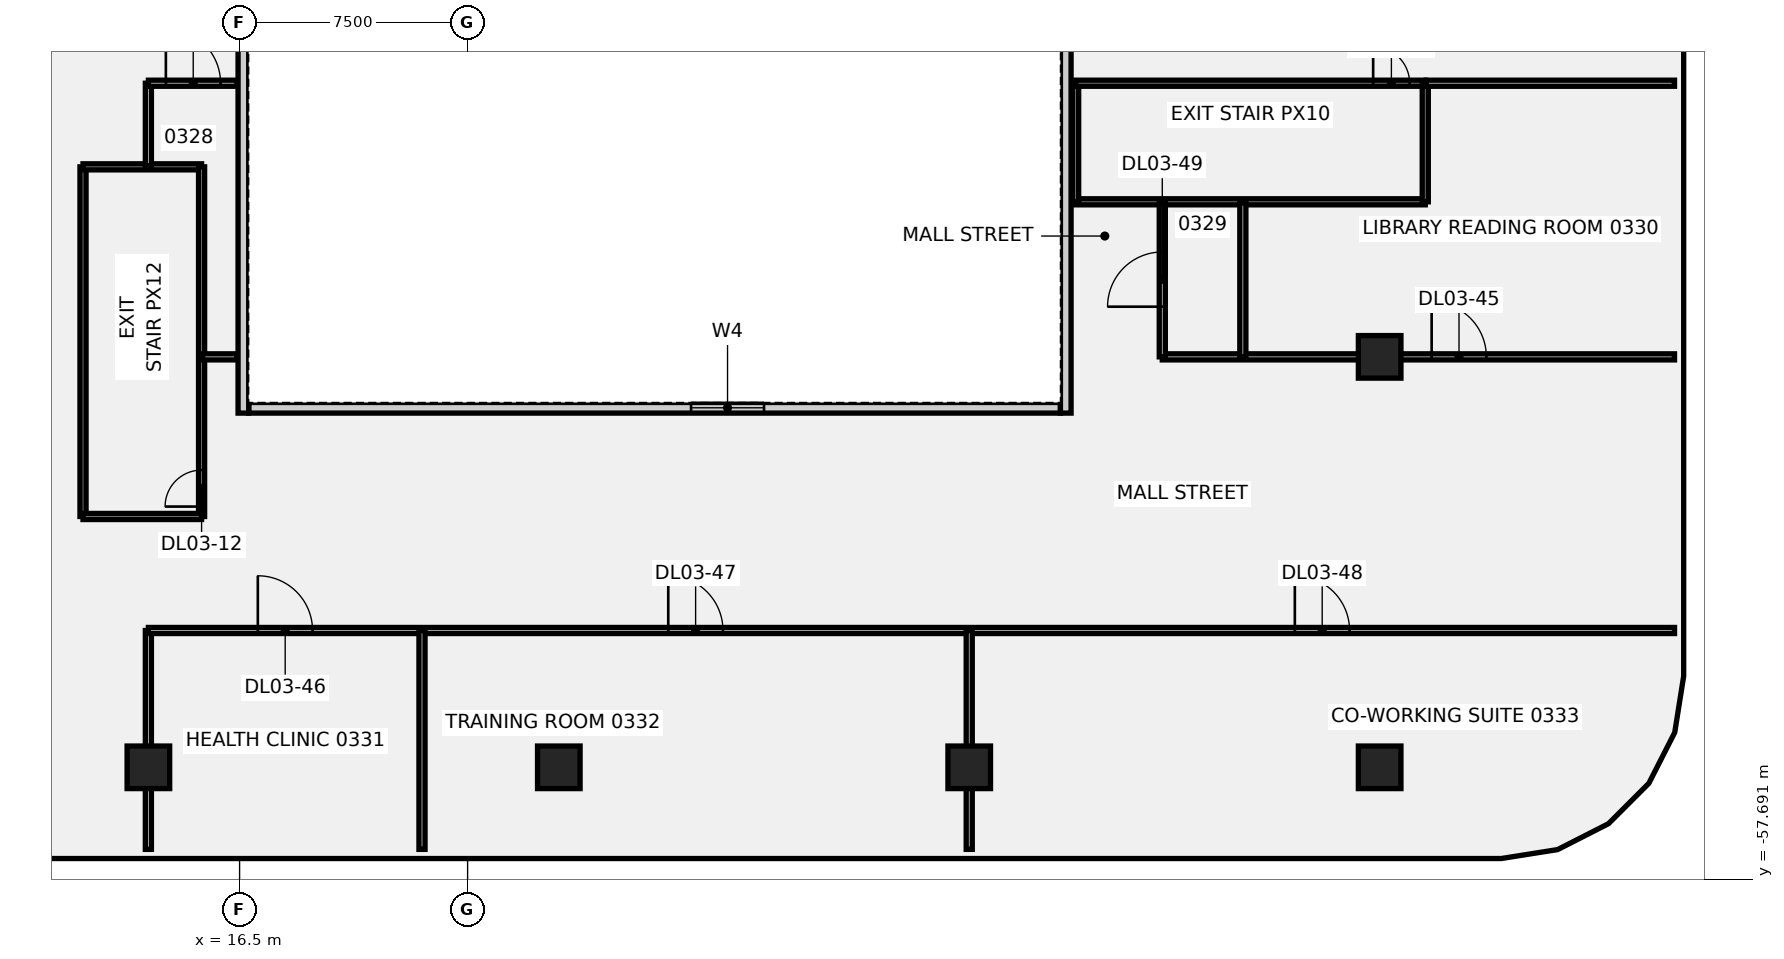
"""IFC4 building model, lengths in metres.
Left out: names, types, materials, properties, quantities, classifications, styles, units other than length and angle.
Written with IfcOpenShell. Run it as: python <this file> out.ifc"""

import sys

from ifc_helpers import new_model, si_unit, direction, frame, frame_2d, origin, origin_2d, place, context, subcontext, project, spatial, rectangle, extrude, element, fill, save


model = new_model("IFC4")
c1 = context("Model", 3, precision=1e-05, world=origin(), true_north=direction((0.0, 1.0)))
c2 = subcontext(c1, "Body", "Model", "MODEL_VIEW")
j1 = project(units=[si_unit("LENGTHUNIT", "METRE"), si_unit("PLANEANGLEUNIT", "RADIAN")], contexts=[c1])
p1 = place(None, origin())
s1 = spatial("IfcSite", under=j1, at=p1, CompositionType="ELEMENT")
p2 = place(p1, origin())
s2 = spatial("IfcBuilding", under=s1, at=p2, CompositionType="ELEMENT")
p3 = place(p2, frame((0.0, 0.0, 20.0)))
s3 = spatial("IfcBuildingStorey", under=s2, at=p3, CompositionType="ELEMENT", Elevation=20.0)
for number, where, z_axis, x_axis in (
    (1, (13.5, -54.0, -0.5), (0.0, 0.0, 1.0), (1.0, 0.0, 0.0)),
    (2, (27.0, -54.0, -0.5), (0.0, 0.0, 1.0), (1.0, 0.0, 0.0)),
    (3, (40.5, -54.0, -0.5), (0.0, 0.0, 1.0), (1.0, 0.0, 0.0)),
    (4, (54.0, -54.0, -0.5), (0.0, 0.0, 1.0), (1.0, 0.0, 0.0)),
    (5, (54.0, -40.5, -0.5), (0.0, 0.0, 1.0), (1.0, 0.0, 0.0)),
):
    element("IfcColumn", number, at=place(p3, frame(where, z_axis=z_axis, x_axis=x_axis)), inside=s3, PredefinedType="COLUMN", context=c2, shape_type="SweptSolid", body=[
        extrude(rectangle(XDim=1.4, YDim=1.4, at=origin_2d()), origin(), (0.0, 0.0, 1.0), 5.05),
    ])
p4 = place(p3, frame((11.35, -45.75, 0.0), z_axis=(0.0, 0.0, 1.0), x_axis=(0.0, 1.0, 0.0)))
e6 = element("IfcWall", 6, at=p4, inside=s3, PredefinedType="PARTITIONING", context=c2, shape_type="SweptSolid", body=[
    extrude(rectangle(XDim=11.5, YDim=0.2, at=frame_2d((5.75, 0.0))), origin(), (0.0, 0.0, 1.0), 4.55),
])
p5 = place(p3, frame((11.35, -34.25, 0.0), z_axis=(0.0, 0.0, 1.0), x_axis=(1.0, 0.0, 0.0)))
e7 = element("IfcWall", 7, at=p5, inside=s3, PredefinedType="PARTITIONING", context=c2, shape_type="SweptSolid", body=[
    extrude(rectangle(XDim=3.9, YDim=0.2, at=frame_2d((1.95, 0.0))), origin(), (0.0, 0.0, 1.0), 4.55),
])
p6 = place(p3, frame((15.25, -45.75, 0.0), z_axis=(0.0, 0.0, 1.0), x_axis=(0.0, 1.0, 0.0)))
e8 = element("IfcWall", 8, at=p6, inside=s3, PredefinedType="PARTITIONING", context=c2, shape_type="SweptSolid", body=[
    extrude(rectangle(XDim=11.5, YDim=0.2, at=frame_2d((5.75, 0.0))), origin(), (0.0, 0.0, 1.0), 4.55),
])
p7 = place(p6, frame((0.326, 0.0, 0.0)))
e9 = element("IfcOpeningElement", 9, at=p7, cuts=e8, PredefinedType="OPENING", context=c2, shape_type="SweptSolid", body=[
    extrude(rectangle(XDim=1.2, YDim=2.1, at=frame_2d((0.6, 1.05))), frame((0.0, 0.11, 0.0), z_axis=(0.0, -1.0, 0.0), x_axis=(1.0, 0.0, 0.0)), (0.0, 0.0, 1.0), 0.22),
])
p8 = place(p3, frame((11.35, -45.75, 0.0), z_axis=(0.0, 0.0, 1.0), x_axis=(1.0, 0.0, 0.0)))
e10 = element("IfcWall", 10, at=p8, inside=s3, PredefinedType="PARTITIONING", context=c2, shape_type="SweptSolid", body=[
    extrude(rectangle(XDim=3.9, YDim=0.2, at=frame_2d((1.95, 0.0))), origin(), (0.0, 0.0, 1.0), 4.55),
])
p9 = place(p3, frame((44.0, -35.4, 0.0), z_axis=(0.0, 0.0, 1.0), x_axis=(1.0, 0.0, 0.0)))
e11 = element("IfcWall", 11, at=p9, inside=s3, PredefinedType="PARTITIONING", context=c2, shape_type="SweptSolid", body=[
    extrude(rectangle(XDim=11.5, YDim=0.2, at=frame_2d((5.75, 0.0))), origin(), (0.0, 0.0, 1.0), 4.55),
])
p10 = place(p3, frame((44.0, -35.4, 0.0), z_axis=(0.0, 0.0, 1.0), x_axis=(0.0, 1.0, 0.0)))
e12 = element("IfcWall", 12, at=p10, inside=s3, PredefinedType="PARTITIONING", context=c2, shape_type="SweptSolid", body=[
    extrude(rectangle(XDim=3.9, YDim=0.2, at=frame_2d((1.95, 0.0))), origin(), (0.0, 0.0, 1.0), 4.55),
])
p11 = place(p3, frame((44.0, -31.5, 0.0), z_axis=(0.0, 0.0, 1.0), x_axis=(1.0, 0.0, 0.0)))
e13 = element("IfcWall", 13, at=p11, inside=s3, PredefinedType="PARTITIONING", context=c2, shape_type="SweptSolid", body=[
    extrude(rectangle(XDim=11.5, YDim=0.2, at=frame_2d((5.75, 0.0))), origin(), (0.0, 0.0, 1.0), 4.55),
])
p12 = place(p11, frame((9.786, 0.0, 0.0)))
e14 = element("IfcOpeningElement", 14, at=p12, cuts=e13, PredefinedType="OPENING", context=c2, shape_type="SweptSolid", body=[
    extrude(rectangle(XDim=1.2, YDim=2.1, at=frame_2d((0.6, 1.05))), frame((0.0, 0.11, 0.0), z_axis=(0.0, -1.0, 0.0), x_axis=(1.0, 0.0, 0.0)), (0.0, 0.0, 1.0), 0.22),
])
p13 = place(p3, frame((55.5, -35.4, 0.0), z_axis=(0.0, 0.0, 1.0), x_axis=(0.0, 1.0, 0.0)))
e15 = element("IfcWall", 15, at=p13, inside=s3, PredefinedType="PARTITIONING", context=c2, shape_type="SweptSolid", body=[
    extrude(rectangle(XDim=3.9, YDim=0.2, at=frame_2d((1.95, 0.0))), origin(), (0.0, 0.0, 1.0), 4.55),
])
p14 = place(p3, frame((13.5, -56.699, 0.0), z_axis=(0.0, 0.0, 1.0), x_axis=(0.0, 1.0, 0.0)))
e16 = element("IfcWall", 16, at=p14, inside=s3, PredefinedType="PARTITIONING", context=c2, shape_type="SweptSolid", body=[
    extrude(rectangle(XDim=7.199, YDim=0.2, at=frame_2d((3.6, 0.0))), origin(), (0.0, 0.0, 1.0), 4.55),
])
p15 = place(p3, frame((13.5, -49.5, 0.0), z_axis=(0.0, 0.0, 1.0), x_axis=(1.0, 0.0, 0.0)))
e17 = element("IfcWall", 17, at=p15, inside=s3, PredefinedType="PARTITIONING", context=c2, shape_type="SweptSolid", body=[
    extrude(rectangle(XDim=50.199, YDim=0.2, at=frame_2d((25.1, 0.0))), origin(), (0.0, 0.0, 1.0), 4.55),
])
p16 = place(p15, frame((3.6, 0.0, 0.0)))
e18 = element("IfcOpeningElement", 18, at=p16, cuts=e17, PredefinedType="OPENING", context=c2, shape_type="SweptSolid", body=[
    extrude(rectangle(XDim=1.8, YDim=2.1, at=frame_2d((0.9, 1.05))), frame((0.0, 0.11, 0.0), z_axis=(0.0, -1.0, 0.0), x_axis=(1.0, 0.0, 0.0)), (0.0, 0.0, 1.0), 0.22),
])
p17 = place(p15, frame((17.1, 0.0, 0.0)))
e19 = element("IfcOpeningElement", 19, at=p17, cuts=e17, PredefinedType="OPENING", context=c2, shape_type="SweptSolid", body=[
    extrude(rectangle(XDim=1.8, YDim=2.1, at=frame_2d((0.9, 1.05))), frame((0.0, 0.11, 0.0), z_axis=(0.0, -1.0, 0.0), x_axis=(1.0, 0.0, 0.0)), (0.0, 0.0, 1.0), 0.22),
])
p18 = place(p15, frame((37.71, 0.0, 0.0)))
e20 = element("IfcOpeningElement", 20, at=p18, cuts=e17, PredefinedType="OPENING", context=c2, shape_type="SweptSolid", body=[
    extrude(rectangle(XDim=1.8, YDim=2.1, at=frame_2d((0.9, 1.05))), frame((0.0, 0.11, 0.0), z_axis=(0.0, -1.0, 0.0), x_axis=(1.0, 0.0, 0.0)), (0.0, 0.0, 1.0), 0.22),
])
p19 = place(p3, frame((13.5, -34.22, 0.0), z_axis=(0.0, 0.0, 1.0), x_axis=(0.0, 1.0, 0.0)))
e21 = element("IfcWall", 21, at=p19, inside=s3, PredefinedType="PARTITIONING", context=c2, shape_type="SweptSolid", body=[
    extrude(rectangle(XDim=2.72, YDim=0.2, at=frame_2d((1.36, 0.0))), origin(), (0.0, 0.0, 1.0), 4.55),
])
p20 = place(p3, frame((13.5, -31.5, 0.0), z_axis=(0.0, 0.0, 1.0), x_axis=(1.0, 0.0, 0.0)))
e22 = element("IfcWall", 22, at=p20, inside=s3, PredefinedType="PARTITIONING", context=c2, shape_type="SweptSolid", body=[
    extrude(rectangle(XDim=2.92, YDim=0.2, at=frame_2d((1.46, 0.0))), origin(), (0.0, 0.0, 1.0), 4.55),
])
p21 = place(p20, frame((0.575, 0.0, 0.0)))
e23 = element("IfcOpeningElement", 23, at=p21, cuts=e22, PredefinedType="OPENING", context=c2, shape_type="SweptSolid", body=[
    extrude(rectangle(XDim=1.8, YDim=2.1, at=frame_2d((0.9, 1.05))), frame((0.0, 0.11, 0.0), z_axis=(0.0, -1.0, 0.0), x_axis=(1.0, 0.0, 0.0)), (0.0, 0.0, 1.0), 0.22),
])
p22 = place(p3, frame((15.28, -40.5, 0.0), z_axis=(0.0, 0.0, 1.0), x_axis=(1.0, 0.0, 0.0)))
e24 = element("IfcWall", 24, at=p22, inside=s3, PredefinedType="PARTITIONING", context=c2, shape_type="SweptSolid", body=[
    extrude(rectangle(XDim=1.14, YDim=0.2, at=frame_2d((0.57, 0.0))), origin(), (0.0, 0.0, 1.0), 4.55),
])
for number, where, z_axis, x_axis in (
    (25, (22.5, -56.699, 0.0), (0.0, 0.0, 1.0), (0.0, 1.0, 0.0)),
    (26, (40.5, -56.699, 0.0), (0.0, 0.0, 1.0), (0.0, 1.0, 0.0)),
):
    element("IfcWall", number, at=place(p3, frame(where, z_axis=z_axis, x_axis=x_axis)), inside=s3, PredefinedType="PARTITIONING", context=c2, shape_type="SweptSolid", body=[
        extrude(rectangle(XDim=7.199, YDim=0.2, at=frame_2d((3.6, 0.0))), origin(), (0.0, 0.0, 1.0), 4.55),
    ])
p23 = place(p3, frame((46.85, -40.5, 0.0), z_axis=(0.0, 0.0, 1.0), x_axis=(1.0, 0.0, 0.0)))
e27 = element("IfcWall", 27, at=p23, inside=s3, PredefinedType="PARTITIONING", context=c2, shape_type="SweptSolid", body=[
    extrude(rectangle(XDim=16.849, YDim=0.2, at=frame_2d((8.424, 0.0))), origin(), (0.0, 0.0, 1.0), 4.55),
])
p24 = place(p23, frame((8.86, 0.0, 0.0)))
e28 = element("IfcOpeningElement", 28, at=p24, cuts=e27, PredefinedType="OPENING", context=c2, shape_type="SweptSolid", body=[
    extrude(rectangle(XDim=1.8, YDim=2.1, at=frame_2d((0.9, 1.05))), frame((0.0, 0.11, 0.0), z_axis=(0.0, -1.0, 0.0), x_axis=(1.0, 0.0, 0.0)), (0.0, 0.0, 1.0), 0.22),
])
p25 = place(p3, frame((46.85, -40.5, 0.0), z_axis=(0.0, 0.0, 1.0), x_axis=(0.0, 1.0, 0.0)))
e29 = element("IfcWall", 29, at=p25, inside=s3, PredefinedType="PARTITIONING", context=c2, shape_type="SweptSolid", body=[
    extrude(rectangle(XDim=5.07, YDim=0.2, at=frame_2d((2.535, 0.0))), origin(), (0.0, 0.0, 1.0), 4.55),
])
p26 = place(p25, frame((1.65, 0.0, 0.0)))
e30 = element("IfcOpeningElement", 30, at=p26, cuts=e29, PredefinedType="OPENING", context=c2, shape_type="SweptSolid", body=[
    extrude(rectangle(XDim=1.8, YDim=2.1, at=frame_2d((0.9, 1.05))), frame((0.0, 0.11, 0.0), z_axis=(0.0, -1.0, 0.0), x_axis=(1.0, 0.0, 0.0)), (0.0, 0.0, 1.0), 0.22),
])
p27 = place(p3, frame((49.5, -40.5, 0.0), z_axis=(0.0, 0.0, 1.0), x_axis=(0.0, 1.0, 0.0)))
e31 = element("IfcWall", 31, at=p27, inside=s3, PredefinedType="PARTITIONING", context=c2, shape_type="SweptSolid", body=[
    extrude(rectangle(XDim=5.07, YDim=0.2, at=frame_2d((2.535, 0.0))), origin(), (0.0, 0.0, 1.0), 4.55),
])
p28 = place(p3, frame((55.53, -31.5, 0.0), z_axis=(0.0, 0.0, 1.0), x_axis=(1.0, 0.0, 0.0)))
e32 = element("IfcWall", 32, at=p28, inside=s3, PredefinedType="PARTITIONING", context=c2, shape_type="SweptSolid", body=[
    extrude(rectangle(XDim=8.169, YDim=0.2, at=frame_2d((4.084, 0.0))), origin(), (0.0, 0.0, 1.0), 4.55),
])
p29 = place(p3, frame((16.8, -42.175, 0.0), z_axis=(0.0, 0.0, 1.0), x_axis=(1.0, 0.0, 0.0)))
e33 = element("IfcWall", 33, at=p29, inside=s3, PredefinedType="SOLIDWALL", context=c2, shape_type="SweptSolid", body=[
    extrude(rectangle(XDim=26.7, YDim=0.35, at=frame_2d((13.35, 0.0))), origin(), (0.0, 0.0, 1.0), 4.55),
])
p30 = place(p29, frame((14.55, 0.0, 1.0)))
e34 = element("IfcOpeningElement", 34, at=p30, cuts=e33, PredefinedType="OPENING", context=c2, shape_type="SweptSolid", body=[
    extrude(rectangle(XDim=2.4, YDim=1.8, at=frame_2d((1.2, 0.9))), frame((0.0, 0.185, 0.0), z_axis=(0.0, -1.0, 0.0), x_axis=(1.0, 0.0, 0.0)), (0.0, 0.0, 1.0), 0.37),
])
p31 = place(p3, frame((16.625, -42.35, 0.0), z_axis=(0.0, 0.0, 1.0), x_axis=(0.0, 1.0, 0.0)))
e35 = element("IfcWall", 35, at=p31, inside=s3, PredefinedType="SOLIDWALL", context=c2, shape_type="SweptSolid", body=[
    extrude(rectangle(XDim=18.7, YDim=0.35, at=frame_2d((9.35, 0.0))), origin(), (0.0, 0.0, 1.0), 4.55),
])
p32 = place(p31, frame((14.9, 0.0, 1.0)))
e36 = element("IfcOpeningElement", 36, at=p32, cuts=e35, PredefinedType="OPENING", context=c2, shape_type="SweptSolid", body=[
    extrude(rectangle(XDim=2.4, YDim=1.8, at=frame_2d((1.2, 0.9))), frame((0.0, 0.185, 0.0), z_axis=(0.0, -1.0, 0.0), x_axis=(1.0, 0.0, 0.0)), (0.0, 0.0, 1.0), 0.37),
])
p33 = place(p3, frame((43.675, -42.35, 0.0), z_axis=(0.0, 0.0, 1.0), x_axis=(0.0, 1.0, 0.0)))
e37 = element("IfcWall", 37, at=p33, inside=s3, PredefinedType="SOLIDWALL", context=c2, shape_type="SweptSolid", body=[
    extrude(rectangle(XDim=18.7, YDim=0.35, at=frame_2d((9.35, 0.0))), origin(), (0.0, 0.0, 1.0), 4.55),
])
p34 = place(p33, frame((14.9, 0.0, 1.0)))
e38 = element("IfcOpeningElement", 38, at=p34, cuts=e37, PredefinedType="OPENING", context=c2, shape_type="SweptSolid", body=[
    extrude(rectangle(XDim=2.4, YDim=1.8, at=frame_2d((1.2, 0.9))), frame((0.0, 0.185, 0.0), z_axis=(0.0, -1.0, 0.0), x_axis=(1.0, 0.0, 0.0)), (0.0, 0.0, 1.0), 0.37),
])
p35 = place(p12, origin())
e39 = element("IfcDoor", 39, at=p35, inside=s3, OperationType="SINGLE_SWING_RIGHT", PredefinedType="DOOR", context=c2, shape_type="SweptSolid", body=[
    extrude(rectangle(XDim=1.2, YDim=2.1, at=frame_2d((0.6, 1.05))), frame((0.0, 0.025, 0.0), z_axis=(0.0, -1.0, 0.0), x_axis=(1.0, 0.0, 0.0)), (0.0, 0.0, 1.0), 0.05),
])
fill(e14, e39)
p36 = place(p7, origin())
e40 = element("IfcDoor", 40, at=p36, inside=s3, OperationType="SINGLE_SWING_RIGHT", PredefinedType="DOOR", context=c2, shape_type="SweptSolid", body=[
    extrude(rectangle(XDim=1.2, YDim=2.1, at=frame_2d((0.6, 1.05))), frame((0.0, 0.025, 0.0), z_axis=(0.0, -1.0, 0.0), x_axis=(1.0, 0.0, 0.0)), (0.0, 0.0, 1.0), 0.05),
])
fill(e9, e40)
p37 = place(p21, origin())
e41 = element("IfcDoor", 41, at=p37, inside=s3, OperationType="SINGLE_SWING_RIGHT", PredefinedType="DOOR", context=c2, shape_type="SweptSolid", body=[
    extrude(rectangle(XDim=1.8, YDim=2.1, at=frame_2d((0.9, 1.05))), frame((0.0, 0.025, 0.0), z_axis=(0.0, -1.0, 0.0), x_axis=(1.0, 0.0, 0.0)), (0.0, 0.0, 1.0), 0.05),
])
fill(e23, e41)
p38 = place(p24, origin())
e42 = element("IfcDoor", 42, at=p38, inside=s3, OperationType="SINGLE_SWING_LEFT", PredefinedType="DOOR", context=c2, shape_type="SweptSolid", body=[
    extrude(rectangle(XDim=1.8, YDim=2.1, at=frame_2d((0.9, 1.05))), frame((0.0, 0.025, 0.0), z_axis=(0.0, -1.0, 0.0), x_axis=(1.0, 0.0, 0.0)), (0.0, 0.0, 1.0), 0.05),
])
fill(e28, e42)
p39 = place(p16, origin())
e43 = element("IfcDoor", 43, at=p39, inside=s3, OperationType="SINGLE_SWING_RIGHT", PredefinedType="DOOR", context=c2, shape_type="SweptSolid", body=[
    extrude(rectangle(XDim=1.8, YDim=2.1, at=frame_2d((0.9, 1.05))), frame((0.0, 0.025, 0.0), z_axis=(0.0, -1.0, 0.0), x_axis=(1.0, 0.0, 0.0)), (0.0, 0.0, 1.0), 0.05),
])
fill(e18, e43)
p40 = place(p17, origin())
e44 = element("IfcDoor", 44, at=p40, inside=s3, OperationType="SINGLE_SWING_LEFT", PredefinedType="DOOR", context=c2, shape_type="SweptSolid", body=[
    extrude(rectangle(XDim=1.8, YDim=2.1, at=frame_2d((0.9, 1.05))), frame((0.0, 0.025, 0.0), z_axis=(0.0, -1.0, 0.0), x_axis=(1.0, 0.0, 0.0)), (0.0, 0.0, 1.0), 0.05),
])
fill(e19, e44)
p41 = place(p18, origin())
e45 = element("IfcDoor", 45, at=p41, inside=s3, OperationType="SINGLE_SWING_RIGHT", PredefinedType="DOOR", context=c2, shape_type="SweptSolid", body=[
    extrude(rectangle(XDim=1.8, YDim=2.1, at=frame_2d((0.9, 1.05))), frame((0.0, 0.025, 0.0), z_axis=(0.0, -1.0, 0.0), x_axis=(1.0, 0.0, 0.0)), (0.0, 0.0, 1.0), 0.05),
])
fill(e20, e45)
p42 = place(p26, origin())
e46 = element("IfcDoor", 46, at=p42, inside=s3, OperationType="SINGLE_SWING_LEFT", PredefinedType="DOOR", context=c2, shape_type="SweptSolid", body=[
    extrude(rectangle(XDim=1.8, YDim=2.1, at=frame_2d((0.9, 1.05))), frame((0.0, 0.025, 0.0), z_axis=(0.0, -1.0, 0.0), x_axis=(1.0, 0.0, 0.0)), (0.0, 0.0, 1.0), 0.05),
])
fill(e30, e46)
p43 = place(p30, origin())
e47 = element("IfcWindow", 47, at=p43, inside=s3, PartitioningType="SINGLE_PANEL", PredefinedType="WINDOW", context=c2, shape_type="SweptSolid", body=[
    extrude(rectangle(XDim=2.4, YDim=1.8, at=frame_2d((1.2, 0.9))), frame((0.0, 0.03, 0.0), z_axis=(0.0, -1.0, 0.0), x_axis=(1.0, 0.0, 0.0)), (0.0, 0.0, 1.0), 0.06),
])
fill(e34, e47)
save(model, sys.argv[1])
